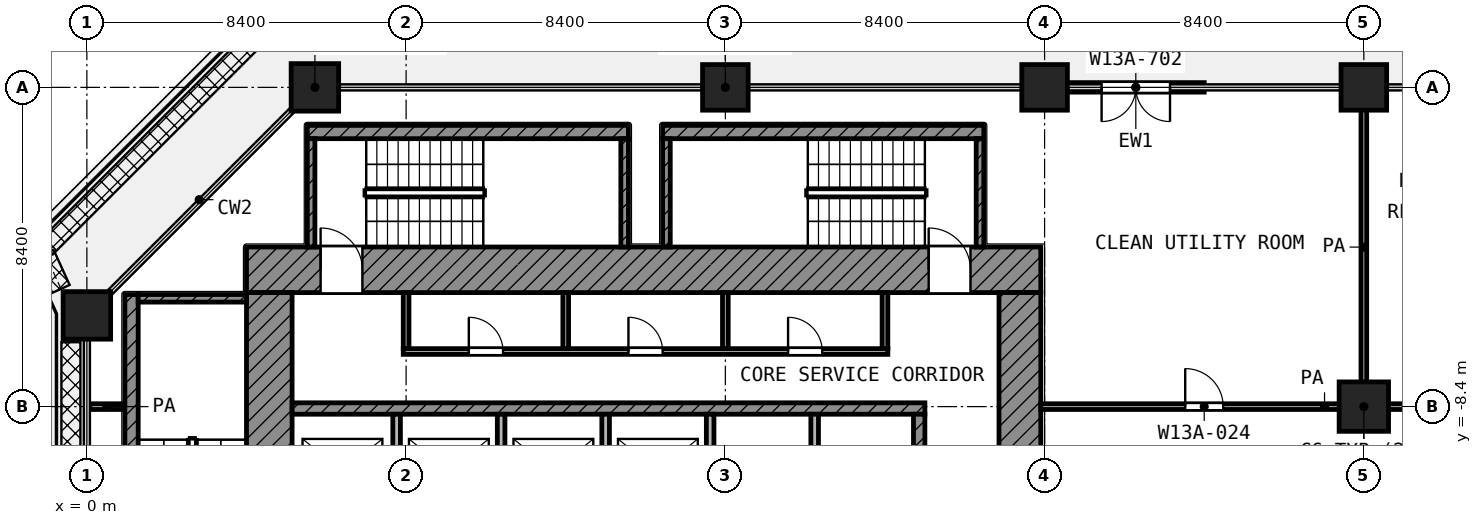
"""IFC4 building model, lengths in metres.
Left out: names, types, materials, properties, quantities, classifications, styles, units other than length and angle.
Written with IfcOpenShell. Run it as: python <this file> out.ifc"""

import sys

from ifc_helpers import new_model, si_unit, direction, frame, frame_2d, origin, origin_2d, place, context, subcontext, project, spatial, rectangle, extrude, element, fill, save


model = new_model("IFC4")
c1 = context("Model", 3, precision=1e-05, world=origin(), true_north=direction((0.0, 1.0)))
c2 = subcontext(c1, "Body", "Model", "MODEL_VIEW")
j1 = project(units=[si_unit("LENGTHUNIT", "METRE"), si_unit("PLANEANGLEUNIT", "RADIAN")], contexts=[c1])
p1 = place(None, origin())
s1 = spatial("IfcSite", under=j1, at=p1, CompositionType="ELEMENT")
p2 = place(p1, origin())
s2 = spatial("IfcBuilding", under=s1, at=p2, CompositionType="ELEMENT")
p3 = place(p2, frame((0.0, 0.0, 60.2)))
s3 = spatial("IfcBuildingStorey", under=s2, at=p3, CompositionType="ELEMENT", Elevation=60.2)
p4 = place(p3, frame((6.0, 0.0, 0.0), z_axis=(0.0, 0.0, 1.0), x_axis=(1.0, 0.0, 0.0)))
e1 = element("IfcColumn", 1, at=p4, inside=s3, PredefinedType="COLUMN", context=c2, shape_type="SweptSolid", body=[
    extrude(rectangle(XDim=1.25, YDim=1.25, at=origin_2d()), origin(), (0.0, 0.0, 1.0), 4.2),
])
for number, where, z_axis, x_axis in (
    (2, (16.8, 0.0, 0.0), (0.0, 0.0, 1.0), (1.0, 0.0, 0.0)),
    (3, (25.2, 0.0, 0.0), (0.0, 0.0, 1.0), (1.0, 0.0, 0.0)),
    (4, (33.6, 0.0, 0.0), (0.0, 0.0, 1.0), (1.0, 0.0, 0.0)),
):
    element("IfcColumn", number, at=place(p3, frame(where, z_axis=z_axis, x_axis=x_axis)), inside=s3, PredefinedType="COLUMN", context=c2, shape_type="SweptSolid", body=[
        extrude(rectangle(XDim=1.2, YDim=1.2, at=origin_2d()), origin(), (0.0, 0.0, 1.0), 4.2),
    ])
p5 = place(p3, frame((0.0, -6.0, 0.0), z_axis=(0.0, 0.0, 1.0), x_axis=(1.0, 0.0, 0.0)))
e5 = element("IfcColumn", 5, at=p5, inside=s3, PredefinedType="COLUMN", context=c2, shape_type="SweptSolid", body=[
    extrude(rectangle(XDim=1.25, YDim=1.25, at=origin_2d()), origin(), (0.0, 0.0, 1.0), 4.2),
])
p6 = place(p3, frame((33.6, -8.4, 0.0), z_axis=(0.0, 0.0, 1.0), x_axis=(1.0, 0.0, 0.0)))
e6 = element("IfcColumn", 6, at=p6, inside=s3, PredefinedType="COLUMN", context=c2, shape_type="SweptSolid", body=[
    extrude(rectangle(XDim=1.3, YDim=1.3, at=origin_2d()), origin(), (0.0, 0.0, 1.0), 4.2),
])
p7 = place(p3, frame((29.4, 0.0, 0.0), z_axis=(0.0, 0.0, 1.0), x_axis=(-1.0, 0.0, 0.0)))
e7 = element("IfcWall", 7, at=p7, inside=s3, PredefinedType="SOLIDWALL", context=c2, shape_type="SweptSolid", body=[
    extrude(rectangle(XDim=3.6, YDim=0.25, at=frame_2d((1.8, 0.0))), origin(), (0.0, 0.0, 1.0), 3.78),
])
p8 = place(p7, frame((0.9, 0.0, 0.0)))
e8 = element("IfcOpeningElement", 8, at=p8, cuts=e7, PredefinedType="OPENING", context=c2, shape_type="SweptSolid", body=[
    extrude(rectangle(XDim=1.8, YDim=2.1, at=frame_2d((0.9, 1.05))), frame((0.0, 0.135, 0.0), z_axis=(0.0, -1.0, 0.0), x_axis=(1.0, 0.0, 0.0)), (0.0, 0.0, 1.0), 0.27),
])
p9 = place(p3, frame((4.2, -4.8, 0.0), z_axis=(0.0, 0.0, 1.0), x_axis=(1.0, 0.0, 0.0)))
e9 = element("IfcWall", 9, at=p9, inside=s3, PredefinedType="SHEAR", context=c2, shape_type="SweptSolid", body=[
    extrude(rectangle(XDim=20.9, YDim=1.2, at=frame_2d((10.45, 0.0))), origin(), (0.0, 0.0, 1.0), 3.9),
])
p10 = place(p9, frame((1.95, 0.0, 0.0)))
e10 = element("IfcOpeningElement", 10, at=p10, cuts=e9, PredefinedType="OPENING", context=c2, shape_type="SweptSolid", body=[
    extrude(rectangle(XDim=1.1, YDim=2.1, at=frame_2d((0.55, 1.05))), frame((0.0, 0.61, 0.0), z_axis=(0.0, -1.0, 0.0), x_axis=(1.0, 0.0, 0.0)), (0.0, 0.0, 1.0), 1.22),
])
p11 = place(p9, frame((17.95, 0.0, 0.0)))
e11 = element("IfcOpeningElement", 11, at=p11, cuts=e9, PredefinedType="OPENING", context=c2, shape_type="SweptSolid", body=[
    extrude(rectangle(XDim=1.1, YDim=2.1, at=frame_2d((0.55, 1.05))), frame((0.0, 0.61, 0.0), z_axis=(0.0, -1.0, 0.0), x_axis=(1.0, 0.0, 0.0)), (0.0, 0.0, 1.0), 1.22),
])
p12 = place(p3, frame((4.8, -25.1, 0.0), z_axis=(0.0, 0.0, 1.0), x_axis=(0.0, 1.0, 0.0)))
e12 = element("IfcWall", 12, at=p12, inside=s3, PredefinedType="SHEAR", context=c2, shape_type="SweptSolid", body=[
    extrude(rectangle(XDim=19.7, YDim=1.2, at=frame_2d((9.85, 0.0))), origin(), (0.0, 0.0, 1.0), 3.9),
])
p13 = place(p12, frame((11.55, 0.0, 0.0)))
e13 = element("IfcOpeningElement", 13, at=p13, cuts=e12, PredefinedType="OPENING", context=c2, shape_type="SweptSolid", body=[
    extrude(rectangle(XDim=1.1, YDim=2.1, at=frame_2d((0.55, 1.05))), frame((0.0, 0.61, 0.0), z_axis=(0.0, -1.0, 0.0), x_axis=(1.0, 0.0, 0.0)), (0.0, 0.0, 1.0), 1.22),
])
p14 = place(p12, frame((2.25, 0.0, 0.0)))
e14 = element("IfcOpeningElement", 14, at=p14, cuts=e12, PredefinedType="OPENING", context=c2, shape_type="SweptSolid", body=[
    extrude(rectangle(XDim=1.1, YDim=2.1, at=frame_2d((0.55, 1.05))), frame((0.0, 0.61, 0.0), z_axis=(0.0, -1.0, 0.0), x_axis=(1.0, 0.0, 0.0)), (0.0, 0.0, 1.0), 1.22),
])
p15 = place(p3, frame((24.55, -24.0, 0.0), z_axis=(0.0, 0.0, 1.0), x_axis=(0.0, 1.0, 0.0)))
e15 = element("IfcWall", 15, at=p15, inside=s3, PredefinedType="SHEAR", context=c2, shape_type="SweptSolid", body=[
    extrude(rectangle(XDim=18.6, YDim=1.1, at=frame_2d((9.3, 0.0))), origin(), (0.0, 0.0, 1.0), 3.9),
])
p16 = place(p15, frame((10.5, 0.0, 0.0)))
e16 = element("IfcOpeningElement", 16, at=p16, cuts=e15, PredefinedType="OPENING", context=c2, shape_type="SweptSolid", body=[
    extrude(rectangle(XDim=1.8, YDim=2.1, at=frame_2d((0.9, 1.05))), frame((0.0, 0.56, 0.0), z_axis=(0.0, -1.0, 0.0), x_axis=(1.0, 0.0, 0.0)), (0.0, 0.0, 1.0), 1.12),
])
p17 = place(p3, frame((5.4, -8.45, 0.0), z_axis=(0.0, 0.0, 1.0), x_axis=(1.0, 0.0, 0.0)))
e17 = element("IfcWall", 17, at=p17, inside=s3, PredefinedType="SHEAR", context=c2, shape_type="SweptSolid", body=[
    extrude(rectangle(XDim=16.65, YDim=0.3, at=frame_2d((8.325, 0.0))), origin(), (0.0, 0.0, 1.0), 3.9),
])
p18 = place(p3, frame((21.9, -10.95, 0.0), z_axis=(0.0, 0.0, 1.0), x_axis=(0.0, 1.0, 0.0)))
e18 = element("IfcWall", 18, at=p18, inside=s3, PredefinedType="SHEAR", context=c2, shape_type="SweptSolid", body=[
    extrude(rectangle(XDim=2.35, YDim=0.3, at=frame_2d((1.175, 0.0))), origin(), (0.0, 0.0, 1.0), 3.9),
])
for number, where, z_axis, x_axis in (
    (19, (8.15, -10.95, 0.0), (0.0, 0.0, 1.0), (0.0, 1.0, 0.0)),
    (20, (10.9, -10.95, 0.0), (0.0, 0.0, 1.0), (0.0, 1.0, 0.0)),
    (21, (13.65, -10.95, 0.0), (0.0, 0.0, 1.0), (0.0, 1.0, 0.0)),
    (22, (16.4, -10.95, 0.0), (0.0, 0.0, 1.0), (0.0, 1.0, 0.0)),
    (23, (19.15, -10.95, 0.0), (0.0, 0.0, 1.0), (0.0, 1.0, 0.0)),
):
    element("IfcWall", number, at=place(p3, frame(where, z_axis=z_axis, x_axis=x_axis)), inside=s3, PredefinedType="PARTITIONING", context=c2, shape_type="SweptSolid", body=[
        extrude(rectangle(XDim=2.35, YDim=0.2, at=frame_2d((1.175, 0.0))), origin(), (0.0, 0.0, 1.0), 3.9),
    ])
p19 = place(p3, frame((8.325, -6.95, 0.0), z_axis=(0.0, 0.0, 1.0), x_axis=(1.0, 0.0, 0.0)))
e24 = element("IfcWall", 24, at=p19, inside=s3, PredefinedType="PARTITIONING", context=c2, shape_type="SweptSolid", body=[
    extrude(rectangle(XDim=12.75, YDim=0.15, at=frame_2d((6.375, 0.0))), origin(), (0.0, 0.0, 1.0), 3.9),
])
p20 = place(p19, frame((1.725, 0.0, 0.0)))
e25 = element("IfcOpeningElement", 25, at=p20, cuts=e24, PredefinedType="OPENING", context=c2, shape_type="SweptSolid", body=[
    extrude(rectangle(XDim=0.9, YDim=2.1, at=frame_2d((0.45, 1.05))), frame((0.0, 0.085, 0.0), z_axis=(0.0, -1.0, 0.0), x_axis=(1.0, 0.0, 0.0)), (0.0, 0.0, 1.0), 0.17),
])
p21 = place(p19, frame((5.925, 0.0, 0.0)))
e26 = element("IfcOpeningElement", 26, at=p21, cuts=e24, PredefinedType="OPENING", context=c2, shape_type="SweptSolid", body=[
    extrude(rectangle(XDim=0.9, YDim=2.1, at=frame_2d((0.45, 1.05))), frame((0.0, 0.085, 0.0), z_axis=(0.0, -1.0, 0.0), x_axis=(1.0, 0.0, 0.0)), (0.0, 0.0, 1.0), 0.17),
])
p22 = place(p19, frame((10.125, 0.0, 0.0)))
e27 = element("IfcOpeningElement", 27, at=p22, cuts=e24, PredefinedType="OPENING", context=c2, shape_type="SweptSolid", body=[
    extrude(rectangle(XDim=0.9, YDim=2.1, at=frame_2d((0.45, 1.05))), frame((0.0, 0.085, 0.0), z_axis=(0.0, -1.0, 0.0), x_axis=(1.0, 0.0, 0.0)), (0.0, 0.0, 1.0), 0.17),
])
for number, where, z_axis, x_axis in (
    (28, (8.4, -6.875, 0.0), (0.0, 0.0, 1.0), (0.0, 1.0, 0.0)),
    (29, (12.6, -6.875, 0.0), (0.0, 0.0, 1.0), (0.0, 1.0, 0.0)),
    (30, (16.8, -6.875, 0.0), (0.0, 0.0, 1.0), (0.0, 1.0, 0.0)),
    (31, (21.0, -6.875, 0.0), (0.0, 0.0, 1.0), (0.0, 1.0, 0.0)),
):
    element("IfcWall", number, at=place(p3, frame(where, z_axis=z_axis, x_axis=x_axis)), inside=s3, PredefinedType="PARTITIONING", context=c2, shape_type="SweptSolid", body=[
        extrude(rectangle(XDim=1.475, YDim=0.15, at=frame_2d((0.738, 0.0))), origin(), (0.0, 0.0, 1.0), 3.9),
    ])
p23 = place(p3, frame((1.175, -13.9, 0.0), z_axis=(0.0, 0.0, 1.0), x_axis=(0.0, 1.0, 0.0)))
e32 = element("IfcWall", 32, at=p23, inside=s3, PredefinedType="SHEAR", context=c2, shape_type="SweptSolid", body=[
    extrude(rectangle(XDim=8.45, YDim=0.35, at=frame_2d((4.225, 0.0))), origin(), (0.0, 0.0, 1.0), 3.9),
])
p24 = place(p3, frame((1.35, -5.55, 0.0), z_axis=(0.0, 0.0, 1.0), x_axis=(1.0, 0.0, 0.0)))
e33 = element("IfcWall", 33, at=p24, inside=s3, PredefinedType="SHEAR", context=c2, shape_type="SweptSolid", body=[
    extrude(rectangle(XDim=2.85, YDim=0.2, at=frame_2d((1.425, 0.0))), origin(), (0.0, 0.0, 1.0), 3.9),
])
p25 = place(p3, frame((5.8, -1.175, 0.0), z_axis=(0.0, 0.0, 1.0), x_axis=(1.0, 0.0, 0.0)))
e34 = element("IfcWall", 34, at=p25, inside=s3, PredefinedType="SHEAR", context=c2, shape_type="SweptSolid", body=[
    extrude(rectangle(XDim=8.45, YDim=0.35, at=frame_2d((4.225, 0.0))), origin(), (0.0, 0.0, 1.0), 3.9),
])
for number, where, z_axis, x_axis in (
    (35, (5.9, -4.2, 0.0), (0.0, 0.0, 1.0), (0.0, 1.0, 0.0)),
    (36, (14.15, -4.2, 0.0), (0.0, 0.0, 1.0), (0.0, 1.0, 0.0)),
):
    element("IfcWall", number, at=place(p3, frame(where, z_axis=z_axis, x_axis=x_axis)), inside=s3, PredefinedType="SHEAR", context=c2, shape_type="SweptSolid", body=[
        extrude(rectangle(XDim=2.85, YDim=0.2, at=frame_2d((1.425, 0.0))), origin(), (0.0, 0.0, 1.0), 3.9),
    ])
p26 = place(p3, frame((15.15, -1.175, 0.0), z_axis=(0.0, 0.0, 1.0), x_axis=(1.0, 0.0, 0.0)))
e37 = element("IfcWall", 37, at=p26, inside=s3, PredefinedType="SHEAR", context=c2, shape_type="SweptSolid", body=[
    extrude(rectangle(XDim=8.45, YDim=0.35, at=frame_2d((4.225, 0.0))), origin(), (0.0, 0.0, 1.0), 3.9),
])
for number, where, z_axis, x_axis in (
    (38, (15.25, -4.2, 0.0), (0.0, 0.0, 1.0), (0.0, 1.0, 0.0)),
    (39, (23.5, -4.2, 0.0), (0.0, 0.0, 1.0), (0.0, 1.0, 0.0)),
):
    element("IfcWall", number, at=place(p3, frame(where, z_axis=z_axis, x_axis=x_axis)), inside=s3, PredefinedType="SHEAR", context=c2, shape_type="SweptSolid", body=[
        extrude(rectangle(XDim=2.85, YDim=0.2, at=frame_2d((1.425, 0.0))), origin(), (0.0, 0.0, 1.0), 3.9),
    ])
p27 = place(p3, frame((0.08, -8.4, 0.0), z_axis=(0.0, 0.0, 1.0), x_axis=(1.0, 0.0, 0.0)))
e40 = element("IfcWall", 40, at=p27, inside=s3, PredefinedType="PARTITIONING", context=c2, shape_type="SweptSolid", body=[
    extrude(rectangle(XDim=0.89, YDim=0.15, at=frame_2d((0.445, 0.0))), origin(), (0.0, 0.0, 1.0), 3.9),
])
p28 = place(p3, frame((25.1, -8.4, 0.0), z_axis=(0.0, 0.0, 1.0), x_axis=(1.0, 0.0, 0.0)))
e41 = element("IfcWall", 41, at=p28, inside=s3, PredefinedType="PARTITIONING", context=c2, shape_type="SweptSolid", body=[
    extrude(rectangle(XDim=14.932, YDim=0.15, at=frame_2d((7.466, 0.0))), origin(), (0.0, 0.0, 1.0), 3.9),
])
p29 = place(p28, frame((3.8, 0.0, 0.0)))
e42 = element("IfcOpeningElement", 42, at=p29, cuts=e41, PredefinedType="OPENING", context=c2, shape_type="SweptSolid", body=[
    extrude(rectangle(XDim=1.0, YDim=2.1, at=frame_2d((0.5, 1.05))), frame((0.0, 0.085, 0.0), z_axis=(0.0, -1.0, 0.0), x_axis=(1.0, 0.0, 0.0)), (0.0, 0.0, 1.0), 0.17),
])
p30 = place(p28, frame((10.0, 0.0, 0.0)))
e43 = element("IfcOpeningElement", 43, at=p30, cuts=e41, PredefinedType="OPENING", context=c2, shape_type="SweptSolid", body=[
    extrude(rectangle(XDim=1.2, YDim=2.1, at=frame_2d((0.6, 1.05))), frame((0.0, 0.085, 0.0), z_axis=(0.0, -1.0, 0.0), x_axis=(1.0, 0.0, 0.0)), (0.0, 0.0, 1.0), 0.17),
])
p31 = place(p3, frame((33.6, -8.325, 0.0), z_axis=(0.0, 0.0, 1.0), x_axis=(0.0, 1.0, 0.0)))
e44 = element("IfcWall", 44, at=p31, inside=s3, PredefinedType="PARTITIONING", context=c2, shape_type="SweptSolid", body=[
    extrude(rectangle(XDim=8.245, YDim=0.15, at=frame_2d((4.123, 0.0))), origin(), (0.0, 0.0, 1.0), 3.9),
])
p32 = place(p8, origin())
e45 = element("IfcDoor", 45, at=p32, inside=s3, OperationType="DOUBLE_DOOR_SINGLE_SWING", PredefinedType="DOOR", context=c2, shape_type="SweptSolid", body=[
    extrude(rectangle(XDim=1.8, YDim=2.1, at=frame_2d((0.9, 1.05))), frame((0.0, 0.025, 0.0), z_axis=(0.0, -1.0, 0.0), x_axis=(1.0, 0.0, 0.0)), (0.0, 0.0, 1.0), 0.05),
])
fill(e8, e45)
p33 = place(p10, origin())
e46 = element("IfcDoor", 46, at=p33, inside=s3, OperationType="SINGLE_SWING_LEFT", PredefinedType="DOOR", context=c2, shape_type="SweptSolid", body=[
    extrude(rectangle(XDim=1.1, YDim=2.1, at=frame_2d((0.55, 1.05))), frame((0.0, 0.025, 0.0), z_axis=(0.0, -1.0, 0.0), x_axis=(1.0, 0.0, 0.0)), (0.0, 0.0, 1.0), 0.05),
])
fill(e10, e46)
p34 = place(p11, origin())
e47 = element("IfcDoor", 47, at=p34, inside=s3, OperationType="SINGLE_SWING_LEFT", PredefinedType="DOOR", context=c2, shape_type="SweptSolid", body=[
    extrude(rectangle(XDim=1.1, YDim=2.1, at=frame_2d((0.55, 1.05))), frame((0.0, 0.025, 0.0), z_axis=(0.0, -1.0, 0.0), x_axis=(1.0, 0.0, 0.0)), (0.0, 0.0, 1.0), 0.05),
])
fill(e11, e47)
p35 = place(p20, origin())
e48 = element("IfcDoor", 48, at=p35, inside=s3, OperationType="SINGLE_SWING_LEFT", PredefinedType="DOOR", context=c2, shape_type="SweptSolid", body=[
    extrude(rectangle(XDim=0.9, YDim=2.1, at=frame_2d((0.45, 1.05))), frame((0.0, 0.025, 0.0), z_axis=(0.0, -1.0, 0.0), x_axis=(1.0, 0.0, 0.0)), (0.0, 0.0, 1.0), 0.05),
])
fill(e25, e48)
p36 = place(p21, origin())
e49 = element("IfcDoor", 49, at=p36, inside=s3, OperationType="SINGLE_SWING_LEFT", PredefinedType="DOOR", context=c2, shape_type="SweptSolid", body=[
    extrude(rectangle(XDim=0.9, YDim=2.1, at=frame_2d((0.45, 1.05))), frame((0.0, 0.025, 0.0), z_axis=(0.0, -1.0, 0.0), x_axis=(1.0, 0.0, 0.0)), (0.0, 0.0, 1.0), 0.05),
])
fill(e26, e49)
p37 = place(p22, origin())
e50 = element("IfcDoor", 50, at=p37, inside=s3, OperationType="SINGLE_SWING_LEFT", PredefinedType="DOOR", context=c2, shape_type="SweptSolid", body=[
    extrude(rectangle(XDim=0.9, YDim=2.1, at=frame_2d((0.45, 1.05))), frame((0.0, 0.025, 0.0), z_axis=(0.0, -1.0, 0.0), x_axis=(1.0, 0.0, 0.0)), (0.0, 0.0, 1.0), 0.05),
])
fill(e27, e50)
p38 = place(p29, origin())
e51 = element("IfcDoor", 51, at=p38, inside=s3, OperationType="SINGLE_SWING_LEFT", PredefinedType="DOOR", context=c2, shape_type="SweptSolid", body=[
    extrude(rectangle(XDim=1.0, YDim=2.1, at=frame_2d((0.5, 1.05))), frame((0.0, 0.025, 0.0), z_axis=(0.0, -1.0, 0.0), x_axis=(1.0, 0.0, 0.0)), (0.0, 0.0, 1.0), 0.05),
])
fill(e42, e51)
save(model, sys.argv[1])
